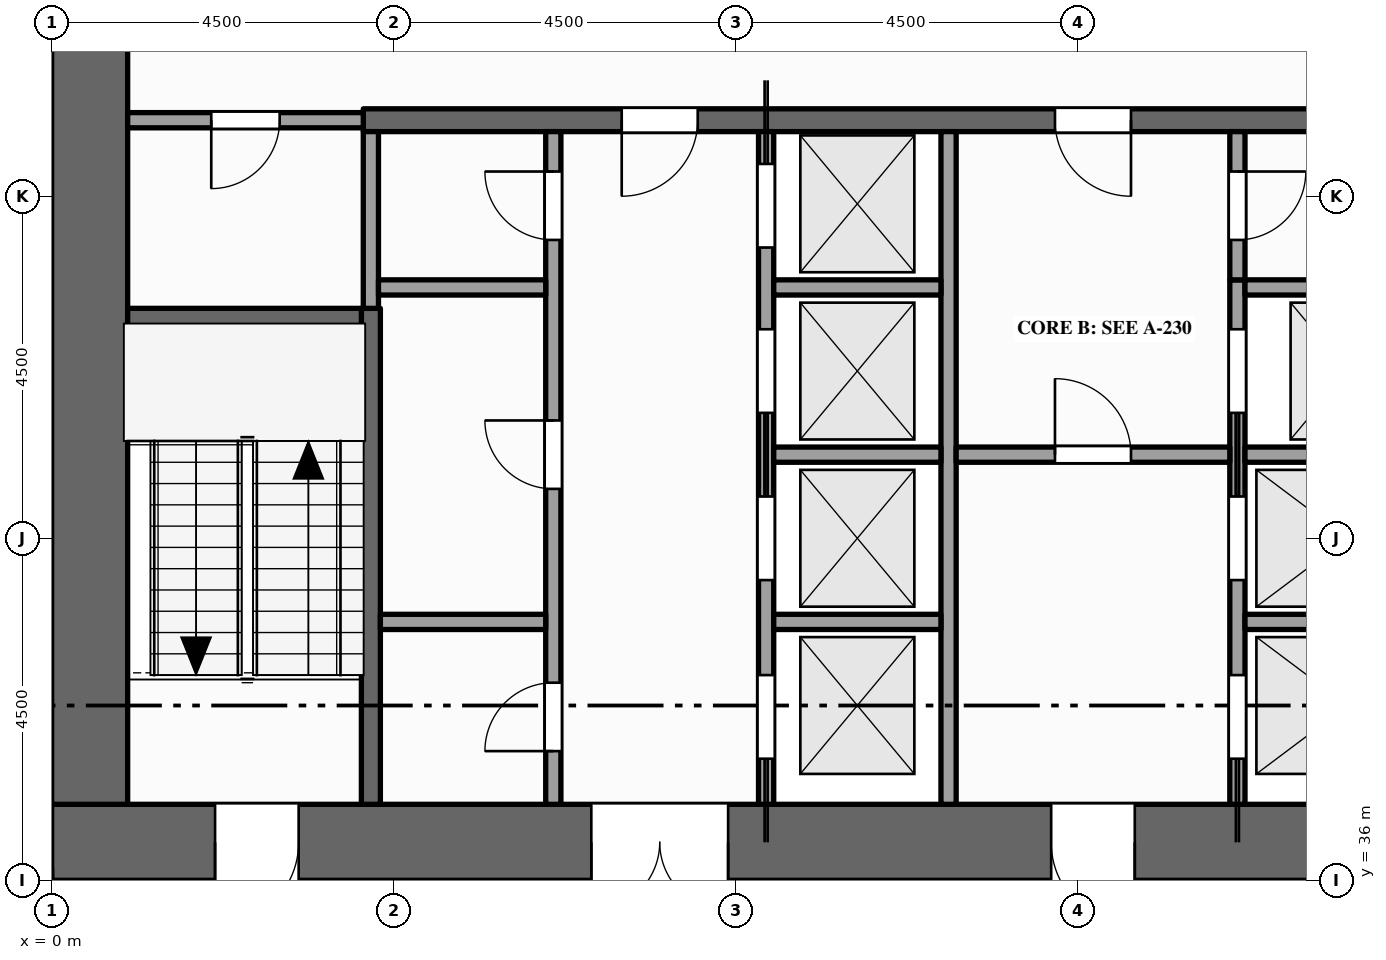
"""IFC4 building model, lengths in metres.
Left out: names, types, materials, properties, quantities, classifications, styles, units other than length and angle.
Written with IfcOpenShell. Run it as: python <this file> out.ifc"""

import sys

from ifc_helpers import new_model, si_unit, direction, frame, frame_2d, origin, place, context, subcontext, project, spatial, rectangle, extrude, element, fill, save


model = new_model("IFC4")
c1 = context("Model", 3, precision=1e-05, world=origin(), true_north=direction((0.0, 1.0)))
c2 = subcontext(c1, "Body", "Model", "MODEL_VIEW")
j1 = project(units=[si_unit("LENGTHUNIT", "METRE"), si_unit("PLANEANGLEUNIT", "RADIAN")], contexts=[c1])
p1 = place(None, origin())
s1 = spatial("IfcSite", under=j1, at=p1, CompositionType="ELEMENT")
p2 = place(p1, origin())
s2 = spatial("IfcBuilding", under=s1, at=p2, CompositionType="ELEMENT")
p3 = place(p2, frame((0.0, 0.0, 159.0)))
s3 = spatial("IfcBuildingStorey", under=s2, at=p3, CompositionType="ELEMENT", Elevation=159.0)
p4 = place(p3, frame((0.0, 36.5, -0.15), z_axis=(0.0, 0.0, 1.0), x_axis=(1.0, 0.0, 0.0)))
e1 = element("IfcWall", 1, at=p4, inside=s3, PredefinedType="SHEAR", context=c2, shape_type="SweptSolid", body=[
    extrude(rectangle(XDim=22.5, YDim=1.0, at=frame_2d((11.25, 0.0))), origin(), (0.0, 0.0, 1.0), 4.0),
])
p5 = place(p4, frame((7.1, 0.0, 0.15)))
e2 = element("IfcOpeningElement", 2, at=p5, cuts=e1, PredefinedType="OPENING", context=c2, shape_type="SweptSolid", body=[
    extrude(rectangle(XDim=1.8, YDim=2.1, at=frame_2d((0.9, 1.05))), frame((0.0, 0.51, 0.0), z_axis=(0.0, -1.0, 0.0), x_axis=(1.0, 0.0, 0.0)), (0.0, 0.0, 1.0), 1.02),
])
p6 = place(p4, frame((13.15, 0.0, 0.15)))
e3 = element("IfcOpeningElement", 3, at=p6, cuts=e1, PredefinedType="OPENING", context=c2, shape_type="SweptSolid", body=[
    extrude(rectangle(XDim=1.1, YDim=2.1, at=frame_2d((0.55, 1.05))), frame((0.0, 0.51, 0.0), z_axis=(0.0, -1.0, 0.0), x_axis=(1.0, 0.0, 0.0)), (0.0, 0.0, 1.0), 1.02),
])
p7 = place(p4, frame((2.15, 0.0, 0.15)))
e4 = element("IfcOpeningElement", 4, at=p7, cuts=e1, PredefinedType="OPENING", context=c2, shape_type="SweptSolid", body=[
    extrude(rectangle(XDim=1.1, YDim=2.1, at=frame_2d((0.55, 1.05))), frame((0.0, 0.51, 0.0), z_axis=(0.0, -1.0, 0.0), x_axis=(1.0, 0.0, 0.0)), (0.0, 0.0, 1.0), 1.02),
])
p8 = place(p4, frame((19.35, 0.0, 0.15)))
e5 = element("IfcOpeningElement", 5, at=p8, cuts=e1, PredefinedType="OPENING", context=c2, shape_type="SweptSolid", body=[
    extrude(rectangle(XDim=1.1, YDim=2.1, at=frame_2d((0.55, 1.05))), frame((0.0, 0.51, 0.0), z_axis=(0.0, -1.0, 0.0), x_axis=(1.0, 0.0, 0.0)), (0.0, 0.0, 1.0), 1.02),
])
p9 = place(p3, frame((0.5, 37.0, -0.15), z_axis=(0.0, 0.0, 1.0), x_axis=(0.0, 1.0, 0.0)))
e6 = element("IfcWall", 6, at=p9, inside=s3, PredefinedType="SHEAR", context=c2, shape_type="SweptSolid", body=[
    extrude(rectangle(XDim=11.5, YDim=1.0, at=frame_2d((5.75, 0.0))), origin(), (0.0, 0.0, 1.0), 4.0),
])
p10 = place(p3, frame((0.0, 36.0, 0.0), z_axis=(0.0, 0.0, 1.0), x_axis=(-1.0, 0.0, 0.0)))
e7 = element("IfcWall", 7, at=p10, inside=s3, PredefinedType="STANDARD", context=c2, shape_type="SweptSolid", body=[
    extrude(rectangle(XDim=1.05, YDim=0.3, at=frame_2d((0.525, 0.0))), origin(), (0.0, 0.0, 1.0), 2.87),
])
p11 = place(p3, frame((4.2, 37.0, 0.0), z_axis=(0.0, 0.0, 1.0), x_axis=(0.0, 1.0, 0.0)))
e8 = element("IfcWall", 8, at=p11, inside=s3, PredefinedType="SHEAR", context=c2, shape_type="SweptSolid", body=[
    extrude(rectangle(XDim=6.525, YDim=0.25, at=frame_2d((3.262, 0.0))), origin(), (0.0, 0.0, 1.0), 3.85),
])
p12 = place(p3, frame((4.2, 43.525, 0.0), z_axis=(0.0, 0.0, 1.0), x_axis=(0.0, 1.0, 0.0)))
e9 = element("IfcWall", 9, at=p12, inside=s3, PredefinedType="PARTITIONING", context=c2, shape_type="SweptSolid", body=[
    extrude(rectangle(XDim=2.325, YDim=0.2, at=frame_2d((1.163, 0.0))), origin(), (0.0, 0.0, 1.0), 3.85),
])
p13 = place(p3, frame((6.6, 37.0, 0.0), z_axis=(0.0, 0.0, 1.0), x_axis=(0.0, 1.0, 0.0)))
e10 = element("IfcWall", 10, at=p13, inside=s3, PredefinedType="PARTITIONING", context=c2, shape_type="SweptSolid", body=[
    extrude(rectangle(XDim=8.85, YDim=0.2, at=frame_2d((4.425, 0.0))), origin(), (0.0, 0.0, 1.0), 3.85),
])
p14 = place(p13, frame((0.7, 0.0, 0.0)))
e11 = element("IfcOpeningElement", 11, at=p14, cuts=e10, PredefinedType="OPENING", context=c2, shape_type="SweptSolid", body=[
    extrude(rectangle(XDim=0.9, YDim=2.1, at=frame_2d((0.45, 1.05))), frame((0.0, 0.11, 0.0), z_axis=(0.0, -1.0, 0.0), x_axis=(1.0, 0.0, 0.0)), (0.0, 0.0, 1.0), 0.22),
])
p15 = place(p13, frame((4.15, 0.0, 0.0)))
e12 = element("IfcOpeningElement", 12, at=p15, cuts=e10, PredefinedType="OPENING", context=c2, shape_type="SweptSolid", body=[
    extrude(rectangle(XDim=0.9, YDim=2.1, at=frame_2d((0.45, 1.05))), frame((0.0, 0.11, 0.0), z_axis=(0.0, -1.0, 0.0), x_axis=(1.0, 0.0, 0.0)), (0.0, 0.0, 1.0), 0.22),
])
p16 = place(p13, frame((7.425, 0.0, 0.0)))
e13 = element("IfcOpeningElement", 13, at=p16, cuts=e10, PredefinedType="OPENING", context=c2, shape_type="SweptSolid", body=[
    extrude(rectangle(XDim=0.9, YDim=2.1, at=frame_2d((0.45, 1.05))), frame((0.0, 0.11, 0.0), z_axis=(0.0, -1.0, 0.0), x_axis=(1.0, 0.0, 0.0)), (0.0, 0.0, 1.0), 0.22),
])
p17 = place(p3, frame((9.4, 37.0, 0.0), z_axis=(0.0, 0.0, 1.0), x_axis=(0.0, 1.0, 0.0)))
e14 = element("IfcWall", 14, at=p17, inside=s3, PredefinedType="SOLIDWALL", context=c2, shape_type="SweptSolid", body=[
    extrude(rectangle(XDim=8.85, YDim=0.2, at=frame_2d((4.425, 0.0))), origin(), (0.0, 0.0, 1.0), 3.85),
])
p18 = place(p17, frame((0.6, 0.0, 0.012)))
e15 = element("IfcOpeningElement", 15, at=p18, cuts=e14, PredefinedType="OPENING", context=c2, shape_type="SweptSolid", body=[
    extrude(rectangle(XDim=1.1, YDim=2.1, at=frame_2d((0.55, 1.05))), frame((0.0, 0.11, 0.0), z_axis=(0.0, -1.0, 0.0), x_axis=(1.0, 0.0, 0.0)), (0.0, 0.0, 1.0), 0.22),
])
p19 = place(p17, frame((2.95, 0.0, 0.012)))
e16 = element("IfcOpeningElement", 16, at=p19, cuts=e14, PredefinedType="OPENING", context=c2, shape_type="SweptSolid", body=[
    extrude(rectangle(XDim=1.1, YDim=2.1, at=frame_2d((0.55, 1.05))), frame((0.0, 0.11, 0.0), z_axis=(0.0, -1.0, 0.0), x_axis=(1.0, 0.0, 0.0)), (0.0, 0.0, 1.0), 0.22),
])
p20 = place(p17, frame((5.15, 0.0, 0.012)))
e17 = element("IfcOpeningElement", 17, at=p20, cuts=e14, PredefinedType="OPENING", context=c2, shape_type="SweptSolid", body=[
    extrude(rectangle(XDim=1.1, YDim=2.1, at=frame_2d((0.55, 1.05))), frame((0.0, 0.11, 0.0), z_axis=(0.0, -1.0, 0.0), x_axis=(1.0, 0.0, 0.0)), (0.0, 0.0, 1.0), 0.22),
])
p21 = place(p17, frame((7.325, 0.0, 0.012)))
e18 = element("IfcOpeningElement", 18, at=p21, cuts=e14, PredefinedType="OPENING", context=c2, shape_type="SweptSolid", body=[
    extrude(rectangle(XDim=1.1, YDim=2.1, at=frame_2d((0.55, 1.05))), frame((0.0, 0.11, 0.0), z_axis=(0.0, -1.0, 0.0), x_axis=(1.0, 0.0, 0.0)), (0.0, 0.0, 1.0), 0.22),
])
p22 = place(p3, frame((11.8, 37.0, 0.0), z_axis=(0.0, 0.0, 1.0), x_axis=(0.0, 1.0, 0.0)))
e19 = element("IfcWall", 19, at=p22, inside=s3, PredefinedType="SOLIDWALL", context=c2, shape_type="SweptSolid", body=[
    extrude(rectangle(XDim=8.85, YDim=0.2, at=frame_2d((4.425, 0.0))), origin(), (0.0, 0.0, 1.0), 3.85),
])
p23 = place(p3, frame((15.6, 37.0, 0.0), z_axis=(0.0, 0.0, 1.0), x_axis=(0.0, 1.0, 0.0)))
e20 = element("IfcWall", 20, at=p23, inside=s3, PredefinedType="SOLIDWALL", context=c2, shape_type="SweptSolid", body=[
    extrude(rectangle(XDim=6.9, YDim=0.2, at=frame_2d((3.45, 0.0))), origin(), (0.0, 0.0, 1.0), 3.85),
])
p24 = place(p23, frame((0.6, 0.0, 0.012)))
e21 = element("IfcOpeningElement", 21, at=p24, cuts=e20, PredefinedType="OPENING", context=c2, shape_type="SweptSolid", body=[
    extrude(rectangle(XDim=1.1, YDim=2.1, at=frame_2d((0.55, 1.05))), frame((0.0, 0.11, 0.0), z_axis=(0.0, -1.0, 0.0), x_axis=(1.0, 0.0, 0.0)), (0.0, 0.0, 1.0), 0.22),
])
p25 = place(p23, frame((2.95, 0.0, 0.012)))
e22 = element("IfcOpeningElement", 22, at=p25, cuts=e20, PredefinedType="OPENING", context=c2, shape_type="SweptSolid", body=[
    extrude(rectangle(XDim=1.1, YDim=2.1, at=frame_2d((0.55, 1.05))), frame((0.0, 0.11, 0.0), z_axis=(0.0, -1.0, 0.0), x_axis=(1.0, 0.0, 0.0)), (0.0, 0.0, 1.0), 0.22),
])
p26 = place(p23, frame((5.15, 0.0, 0.012)))
e23 = element("IfcOpeningElement", 23, at=p26, cuts=e20, PredefinedType="OPENING", context=c2, shape_type="SweptSolid", body=[
    extrude(rectangle(XDim=1.1, YDim=2.1, at=frame_2d((0.55, 1.05))), frame((0.0, 0.11, 0.0), z_axis=(0.0, -1.0, 0.0), x_axis=(1.0, 0.0, 0.0)), (0.0, 0.0, 1.0), 0.22),
])
p27 = place(p3, frame((15.6, 43.9, 0.0), z_axis=(0.0, 0.0, 1.0), x_axis=(0.0, 1.0, 0.0)))
e24 = element("IfcWall", 24, at=p27, inside=s3, PredefinedType="PARTITIONING", context=c2, shape_type="SweptSolid", body=[
    extrude(rectangle(XDim=1.95, YDim=0.2, at=frame_2d((0.975, 0.0))), origin(), (0.0, 0.0, 1.0), 3.85),
])
p28 = place(p27, frame((0.525, 0.0, 0.0)))
e25 = element("IfcOpeningElement", 25, at=p28, cuts=e24, PredefinedType="OPENING", context=c2, shape_type="SweptSolid", body=[
    extrude(rectangle(XDim=0.9, YDim=2.1, at=frame_2d((0.45, 1.05))), frame((0.0, 0.11, 0.0), z_axis=(0.0, -1.0, 0.0), x_axis=(1.0, 0.0, 0.0)), (0.0, 0.0, 1.0), 0.22),
])
p29 = place(p3, frame((4.325, 39.4, 0.0), z_axis=(0.0, 0.0, 1.0), x_axis=(1.0, 0.0, 0.0)))
e26 = element("IfcWall", 26, at=p29, inside=s3, PredefinedType="PARTITIONING", context=c2, shape_type="SweptSolid", body=[
    extrude(rectangle(XDim=2.175, YDim=0.2, at=frame_2d((1.087, 0.0))), origin(), (0.0, 0.0, 1.0), 3.85),
])
p30 = place(p3, frame((9.5, 39.4, 0.0), z_axis=(0.0, 0.0, 1.0), x_axis=(1.0, 0.0, 0.0)))
e27 = element("IfcWall", 27, at=p30, inside=s3, PredefinedType="SOLIDWALL", context=c2, shape_type="SweptSolid", body=[
    extrude(rectangle(XDim=2.2, YDim=0.2, at=frame_2d((1.1, 0.0))), origin(), (0.0, 0.0, 1.0), 3.85),
])
p31 = place(p3, frame((15.7, 39.4, 0.0), z_axis=(0.0, 0.0, 1.0), x_axis=(1.0, 0.0, 0.0)))
e28 = element("IfcWall", 28, at=p31, inside=s3, PredefinedType="SOLIDWALL", context=c2, shape_type="SweptSolid", body=[
    extrude(rectangle(XDim=2.675, YDim=0.2, at=frame_2d((1.337, 0.0))), origin(), (0.0, 0.0, 1.0), 3.85),
])
p32 = place(p3, frame((9.5, 41.6, 0.0), z_axis=(0.0, 0.0, 1.0), x_axis=(1.0, 0.0, 0.0)))
e29 = element("IfcWall", 29, at=p32, inside=s3, PredefinedType="SOLIDWALL", context=c2, shape_type="SweptSolid", body=[
    extrude(rectangle(XDim=2.2, YDim=0.2, at=frame_2d((1.1, 0.0))), origin(), (0.0, 0.0, 1.0), 3.85),
])
p33 = place(p3, frame((11.9, 41.6, 0.0), z_axis=(0.0, 0.0, 1.0), x_axis=(1.0, 0.0, 0.0)))
e30 = element("IfcWall", 30, at=p33, inside=s3, PredefinedType="PARTITIONING", context=c2, shape_type="SweptSolid", body=[
    extrude(rectangle(XDim=3.6, YDim=0.2, at=frame_2d((1.8, 0.0))), origin(), (0.0, 0.0, 1.0), 3.85),
])
p34 = place(p33, frame((1.3, 0.0, 0.0)))
e31 = element("IfcOpeningElement", 31, at=p34, cuts=e30, PredefinedType="OPENING", context=c2, shape_type="SweptSolid", body=[
    extrude(rectangle(XDim=1.0, YDim=2.1, at=frame_2d((0.5, 1.05))), frame((0.0, 0.11, 0.0), z_axis=(0.0, -1.0, 0.0), x_axis=(1.0, 0.0, 0.0)), (0.0, 0.0, 1.0), 0.22),
])
p35 = place(p3, frame((15.7, 41.6, 0.0), z_axis=(0.0, 0.0, 1.0), x_axis=(1.0, 0.0, 0.0)))
e32 = element("IfcWall", 32, at=p35, inside=s3, PredefinedType="SOLIDWALL", context=c2, shape_type="SweptSolid", body=[
    extrude(rectangle(XDim=2.675, YDim=0.2, at=frame_2d((1.337, 0.0))), origin(), (0.0, 0.0, 1.0), 3.85),
])
p36 = place(p3, frame((1.0, 43.4, 0.0), z_axis=(0.0, 0.0, 1.0), x_axis=(1.0, 0.0, 0.0)))
e33 = element("IfcWall", 33, at=p36, inside=s3, PredefinedType="SHEAR", context=c2, shape_type="SweptSolid", body=[
    extrude(rectangle(XDim=3.075, YDim=0.25, at=frame_2d((1.538, 0.0))), origin(), (0.0, 0.0, 1.0), 3.85),
])
p37 = place(p3, frame((4.3, 43.8, 0.0), z_axis=(0.0, 0.0, 1.0), x_axis=(1.0, 0.0, 0.0)))
e34 = element("IfcWall", 34, at=p37, inside=s3, PredefinedType="PARTITIONING", context=c2, shape_type="SweptSolid", body=[
    extrude(rectangle(XDim=2.2, YDim=0.2, at=frame_2d((1.1, 0.0))), origin(), (0.0, 0.0, 1.0), 3.85),
])
p38 = place(p3, frame((9.5, 43.8, 0.0), z_axis=(0.0, 0.0, 1.0), x_axis=(1.0, 0.0, 0.0)))
e35 = element("IfcWall", 35, at=p38, inside=s3, PredefinedType="SOLIDWALL", context=c2, shape_type="SweptSolid", body=[
    extrude(rectangle(XDim=2.2, YDim=0.2, at=frame_2d((1.1, 0.0))), origin(), (0.0, 0.0, 1.0), 3.85),
])
p39 = place(p3, frame((15.7, 43.8, 0.0), z_axis=(0.0, 0.0, 1.0), x_axis=(1.0, 0.0, 0.0)))
e36 = element("IfcWall", 36, at=p39, inside=s3, PredefinedType="SOLIDWALL", context=c2, shape_type="SweptSolid", body=[
    extrude(rectangle(XDim=2.7, YDim=0.2, at=frame_2d((1.35, 0.0))), origin(), (0.0, 0.0, 1.0), 3.85),
])
p40 = place(p3, frame((1.0, 46.0, 0.0), z_axis=(0.0, 0.0, 1.0), x_axis=(1.0, 0.0, 0.0)))
e37 = element("IfcWall", 37, at=p40, inside=s3, PredefinedType="PARTITIONING", context=c2, shape_type="SweptSolid", body=[
    extrude(rectangle(XDim=3.1, YDim=0.2, at=frame_2d((1.55, 0.0))), origin(), (0.0, 0.0, 1.0), 3.85),
])
p41 = place(p40, frame((1.1, 0.0, 0.0)))
e38 = element("IfcOpeningElement", 38, at=p41, cuts=e37, PredefinedType="OPENING", context=c2, shape_type="SweptSolid", body=[
    extrude(rectangle(XDim=0.9, YDim=2.1, at=frame_2d((0.45, 1.05))), frame((0.0, 0.11, 0.0), z_axis=(0.0, -1.0, 0.0), x_axis=(1.0, 0.0, 0.0)), (0.0, 0.0, 1.0), 0.22),
])
p42 = place(p3, frame((4.1, 46.0, 0.0), z_axis=(0.0, 0.0, 1.0), x_axis=(1.0, 0.0, 0.0)))
e39 = element("IfcWall", 39, at=p42, inside=s3, PredefinedType="SHEAR", context=c2, shape_type="SweptSolid", body=[
    extrude(rectangle(XDim=14.5, YDim=0.3, at=frame_2d((7.25, 0.0))), origin(), (0.0, 0.0, 1.0), 3.85),
])
p43 = place(p42, frame((3.4, 0.0, 0.0)))
e40 = element("IfcOpeningElement", 40, at=p43, cuts=e39, PredefinedType="OPENING", context=c2, shape_type="SweptSolid", body=[
    extrude(rectangle(XDim=1.0, YDim=2.1, at=frame_2d((0.5, 1.05))), frame((0.0, 0.16, 0.0), z_axis=(0.0, -1.0, 0.0), x_axis=(1.0, 0.0, 0.0)), (0.0, 0.0, 1.0), 0.32),
])
p44 = place(p42, frame((9.1, 0.0, 0.0)))
e41 = element("IfcOpeningElement", 41, at=p44, cuts=e39, PredefinedType="OPENING", context=c2, shape_type="SweptSolid", body=[
    extrude(rectangle(XDim=1.0, YDim=2.1, at=frame_2d((0.5, 1.05))), frame((0.0, 0.16, 0.0), z_axis=(0.0, -1.0, 0.0), x_axis=(1.0, 0.0, 0.0)), (0.0, 0.0, 1.0), 0.32),
])
p45 = place(p18, origin())
e42 = element("IfcDoor", 42, at=p45, inside=s3, OperationType="SLIDING_TO_LEFT", PredefinedType="DOOR", context=c2, shape_type="SweptSolid", body=[
    extrude(rectangle(XDim=1.1, YDim=2.1, at=frame_2d((0.55, 1.05))), frame((0.0, 0.025, 0.0), z_axis=(0.0, -1.0, 0.0), x_axis=(1.0, 0.0, 0.0)), (0.0, 0.0, 1.0), 0.05),
])
fill(e15, e42)
p46 = place(p19, origin())
e43 = element("IfcDoor", 43, at=p46, inside=s3, OperationType="SLIDING_TO_RIGHT", PredefinedType="DOOR", context=c2, shape_type="SweptSolid", body=[
    extrude(rectangle(XDim=1.1, YDim=2.1, at=frame_2d((0.55, 1.05))), frame((0.0, 0.025, 0.0), z_axis=(0.0, -1.0, 0.0), x_axis=(1.0, 0.0, 0.0)), (0.0, 0.0, 1.0), 0.05),
])
fill(e16, e43)
p47 = place(p20, origin())
e44 = element("IfcDoor", 44, at=p47, inside=s3, OperationType="SLIDING_TO_LEFT", PredefinedType="DOOR", context=c2, shape_type="SweptSolid", body=[
    extrude(rectangle(XDim=1.1, YDim=2.1, at=frame_2d((0.55, 1.05))), frame((0.0, 0.025, 0.0), z_axis=(0.0, -1.0, 0.0), x_axis=(1.0, 0.0, 0.0)), (0.0, 0.0, 1.0), 0.05),
])
fill(e17, e44)
p48 = place(p21, origin())
e45 = element("IfcDoor", 45, at=p48, inside=s3, OperationType="SLIDING_TO_RIGHT", PredefinedType="DOOR", context=c2, shape_type="SweptSolid", body=[
    extrude(rectangle(XDim=1.1, YDim=2.1, at=frame_2d((0.55, 1.05))), frame((0.0, 0.025, 0.0), z_axis=(0.0, -1.0, 0.0), x_axis=(1.0, 0.0, 0.0)), (0.0, 0.0, 1.0), 0.05),
])
fill(e18, e45)
p49 = place(p24, origin())
e46 = element("IfcDoor", 46, at=p49, inside=s3, OperationType="SLIDING_TO_LEFT", PredefinedType="DOOR", context=c2, shape_type="SweptSolid", body=[
    extrude(rectangle(XDim=1.1, YDim=2.1, at=frame_2d((0.55, 1.05))), frame((0.0, 0.025, 0.0), z_axis=(0.0, -1.0, 0.0), x_axis=(1.0, 0.0, 0.0)), (0.0, 0.0, 1.0), 0.05),
])
fill(e21, e46)
p50 = place(p25, origin())
e47 = element("IfcDoor", 47, at=p50, inside=s3, OperationType="SLIDING_TO_RIGHT", PredefinedType="DOOR", context=c2, shape_type="SweptSolid", body=[
    extrude(rectangle(XDim=1.1, YDim=2.1, at=frame_2d((0.55, 1.05))), frame((0.0, 0.025, 0.0), z_axis=(0.0, -1.0, 0.0), x_axis=(1.0, 0.0, 0.0)), (0.0, 0.0, 1.0), 0.05),
])
fill(e22, e47)
p51 = place(p26, origin())
e48 = element("IfcDoor", 48, at=p51, inside=s3, OperationType="SLIDING_TO_LEFT", PredefinedType="DOOR", context=c2, shape_type="SweptSolid", body=[
    extrude(rectangle(XDim=1.1, YDim=2.1, at=frame_2d((0.55, 1.05))), frame((0.0, 0.025, 0.0), z_axis=(0.0, -1.0, 0.0), x_axis=(1.0, 0.0, 0.0)), (0.0, 0.0, 1.0), 0.05),
])
fill(e23, e48)
p52 = place(p5, origin())
e49 = element("IfcDoor", 49, at=p52, inside=s3, OperationType="DOUBLE_DOOR_SINGLE_SWING", PredefinedType="DOOR", context=c2, shape_type="SweptSolid", body=[
    extrude(rectangle(XDim=1.8, YDim=2.1, at=frame_2d((0.9, 1.05))), frame((0.0, 0.025, 0.0), z_axis=(0.0, -1.0, 0.0), x_axis=(1.0, 0.0, 0.0)), (0.0, 0.0, 1.0), 0.05),
])
fill(e2, e49)
p53 = place(p43, origin())
e50 = element("IfcDoor", 50, at=p53, inside=s3, OperationType="SINGLE_SWING_LEFT", PredefinedType="DOOR", context=c2, shape_type="SweptSolid", body=[
    extrude(rectangle(XDim=1.0, YDim=2.1, at=frame_2d((0.5, 1.05))), frame((0.0, 0.025, 0.0), z_axis=(0.0, -1.0, 0.0), x_axis=(1.0, 0.0, 0.0)), (0.0, 0.0, 1.0), 0.05),
])
fill(e40, e50)
p54 = place(p6, origin())
e51 = element("IfcDoor", 51, at=p54, inside=s3, OperationType="SINGLE_SWING_RIGHT", PredefinedType="DOOR", context=c2, shape_type="SweptSolid", body=[
    extrude(rectangle(XDim=1.1, YDim=2.1, at=frame_2d((0.55, 1.05))), frame((0.0, 0.025, 0.0), z_axis=(0.0, -1.0, 0.0), x_axis=(1.0, 0.0, 0.0)), (0.0, 0.0, 1.0), 0.05),
])
fill(e3, e51)
p55 = place(p34, origin())
e52 = element("IfcDoor", 52, at=p55, inside=s3, OperationType="SINGLE_SWING_LEFT", PredefinedType="DOOR", context=c2, shape_type="SweptSolid", body=[
    extrude(rectangle(XDim=1.0, YDim=2.1, at=frame_2d((0.5, 1.05))), frame((0.0, 0.025, 0.0), z_axis=(0.0, -1.0, 0.0), x_axis=(1.0, 0.0, 0.0)), (0.0, 0.0, 1.0), 0.05),
])
fill(e31, e52)
p56 = place(p44, origin())
e53 = element("IfcDoor", 53, at=p56, inside=s3, OperationType="SINGLE_SWING_RIGHT", PredefinedType="DOOR", context=c2, shape_type="SweptSolid", body=[
    extrude(rectangle(XDim=1.0, YDim=2.1, at=frame_2d((0.5, 1.05))), frame((0.0, 0.025, 0.0), z_axis=(0.0, -1.0, 0.0), x_axis=(1.0, 0.0, 0.0)), (0.0, 0.0, 1.0), 0.05),
])
fill(e41, e53)
p57 = place(p7, origin())
e54 = element("IfcDoor", 54, at=p57, inside=s3, OperationType="SINGLE_SWING_LEFT", PredefinedType="DOOR", context=c2, shape_type="SweptSolid", body=[
    extrude(rectangle(XDim=1.1, YDim=2.1, at=frame_2d((0.55, 1.05))), frame((0.0, 0.025, 0.0), z_axis=(0.0, -1.0, 0.0), x_axis=(1.0, 0.0, 0.0)), (0.0, 0.0, 1.0), 0.05),
])
fill(e4, e54)
p58 = place(p41, origin())
e55 = element("IfcDoor", 55, at=p58, inside=s3, OperationType="SINGLE_SWING_LEFT", PredefinedType="DOOR", context=c2, shape_type="SweptSolid", body=[
    extrude(rectangle(XDim=0.9, YDim=2.1, at=frame_2d((0.45, 1.05))), frame((0.0, 0.025, 0.0), z_axis=(0.0, -1.0, 0.0), x_axis=(1.0, 0.0, 0.0)), (0.0, 0.0, 1.0), 0.05),
])
fill(e38, e55)
p59 = place(p14, origin())
e56 = element("IfcDoor", 56, at=p59, inside=s3, OperationType="SINGLE_SWING_LEFT", PredefinedType="DOOR", context=c2, shape_type="SweptSolid", body=[
    extrude(rectangle(XDim=0.9, YDim=2.1, at=frame_2d((0.45, 1.05))), frame((0.0, 0.025, 0.0), z_axis=(0.0, -1.0, 0.0), x_axis=(1.0, 0.0, 0.0)), (0.0, 0.0, 1.0), 0.05),
])
fill(e11, e56)
p60 = place(p15, origin())
e57 = element("IfcDoor", 57, at=p60, inside=s3, OperationType="SINGLE_SWING_RIGHT", PredefinedType="DOOR", context=c2, shape_type="SweptSolid", body=[
    extrude(rectangle(XDim=0.9, YDim=2.1, at=frame_2d((0.45, 1.05))), frame((0.0, 0.025, 0.0), z_axis=(0.0, -1.0, 0.0), x_axis=(1.0, 0.0, 0.0)), (0.0, 0.0, 1.0), 0.05),
])
fill(e12, e57)
p61 = place(p16, origin())
e58 = element("IfcDoor", 58, at=p61, inside=s3, OperationType="SINGLE_SWING_RIGHT", PredefinedType="DOOR", context=c2, shape_type="SweptSolid", body=[
    extrude(rectangle(XDim=0.9, YDim=2.1, at=frame_2d((0.45, 1.05))), frame((0.0, 0.025, 0.0), z_axis=(0.0, -1.0, 0.0), x_axis=(1.0, 0.0, 0.0)), (0.0, 0.0, 1.0), 0.05),
])
fill(e13, e58)
p62 = place(p28, origin())
e59 = element("IfcDoor", 59, at=p62, inside=s3, OperationType="SINGLE_SWING_RIGHT", PredefinedType="DOOR", context=c2, shape_type="SweptSolid", body=[
    extrude(rectangle(XDim=0.9, YDim=2.1, at=frame_2d((0.45, 1.05))), frame((0.0, 0.025, 0.0), z_axis=(0.0, -1.0, 0.0), x_axis=(1.0, 0.0, 0.0)), (0.0, 0.0, 1.0), 0.05),
])
fill(e25, e59)
save(model, sys.argv[1])
